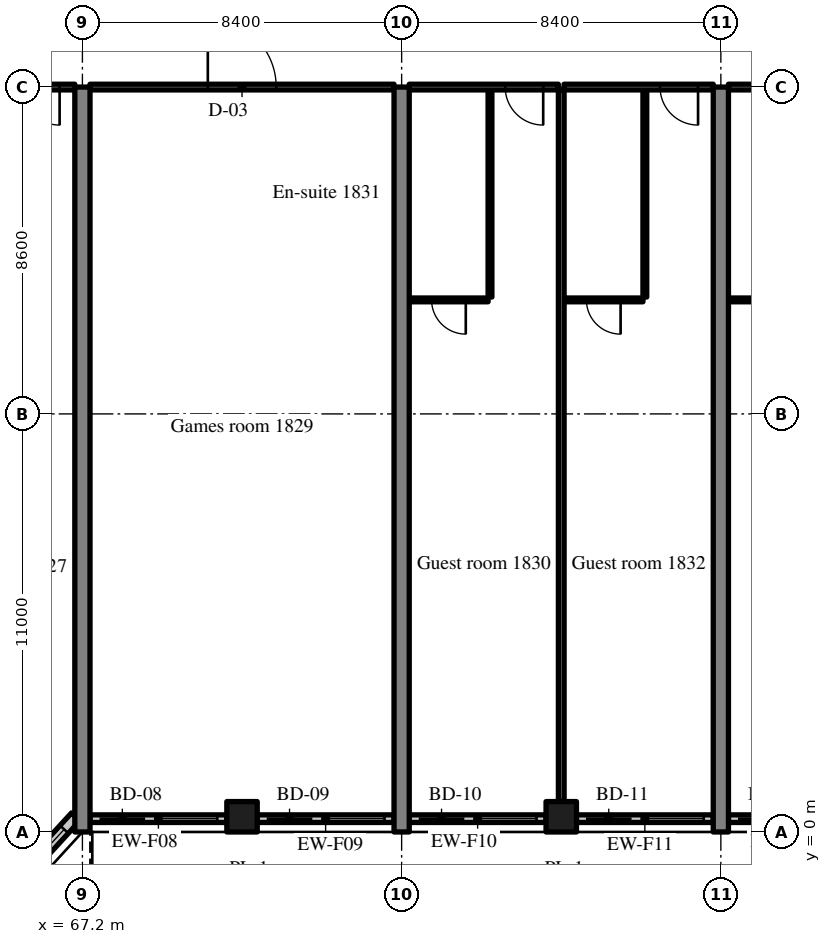
"""IFC4 building model, lengths in metres.
Left out: names, types, materials, properties, quantities, classifications, styles, units other than length and angle.
Written with IfcOpenShell. Run it as: python <this file> out.ifc"""

import sys

from ifc_helpers import new_model, si_unit, direction, frame, frame_2d, origin, origin_2d, place, context, subcontext, project, spatial, rectangle, extrude, source, transform, mapped, element, fill, save


model = new_model("IFC4")
c1 = context("Model", 3, precision=1e-05, world=origin(), true_north=direction((0.0, 1.0)))
c2 = subcontext(c1, "Body", "Model", "MODEL_VIEW")
j1 = project(units=[si_unit("LENGTHUNIT", "METRE"), si_unit("PLANEANGLEUNIT", "RADIAN")], contexts=[c1])
p1 = place(None, origin())
s1 = spatial("IfcSite", under=j1, at=p1, CompositionType="ELEMENT")
p2 = place(p1, origin())
s2 = spatial("IfcBuilding", under=s1, at=p2, CompositionType="ELEMENT")
p3 = place(p2, frame((0.0, 0.0, 77.2)))
s3 = spatial("IfcBuildingStorey", under=s2, at=p3, CompositionType="ELEMENT", Elevation=77.2)
m1 = source(origin(), c2, "Body", "SweptSolid", [
    extrude(rectangle(XDim=19.6, YDim=0.4, at=frame_2d((9.8, 0.0))), origin(), (0.0, 0.0, 1.0), 3.52),
])
for number, where, z_axis, x_axis in (
    (1, (67.2, 0.0, 0.0), (0.0, 0.0, 1.0), (0.0, 1.0, 0.0)),
    (2, (75.6, 0.0, 0.0), (0.0, 0.0, 1.0), (0.0, 1.0, 0.0)),
    (3, (84.0, 0.0, 0.0), (0.0, 0.0, 1.0), (0.0, 1.0, 0.0)),
):
    element("IfcWall", number, at=place(p3, frame(where, z_axis=z_axis, x_axis=x_axis)), inside=s3, PredefinedType="SHEAR", context=c2, shape_type="MappedRepresentation", body=[
        mapped(m1, transform((0.0, 0.0, 0.0), scale=1.0)),
    ])
m2 = source(origin(), c2, "Body", "SweptSolid", [
    extrude(rectangle(XDim=0.8, YDim=0.8, at=origin_2d()), origin(), (0.0, 0.0, 1.0), 3.52),
])
for number, where, z_axis, x_axis in (
    (4, (71.4, 0.4, 0.0), (0.0, 0.0, 1.0), (1.0, 0.0, 0.0)),
    (5, (79.8, 0.4, 0.0), (0.0, 0.0, 1.0), (1.0, 0.0, 0.0)),
):
    element("IfcColumn", number, at=place(p3, frame(where, z_axis=z_axis, x_axis=x_axis)), inside=s3, PredefinedType="COLUMN", context=c2, shape_type="MappedRepresentation", body=[
        mapped(m2, transform((0.0, 0.0, 0.0), scale=1.0)),
    ])
m3 = source(origin(), c2, "Body", "SweptSolid", [
    extrude(rectangle(XDim=2.398, YDim=0.3, at=frame_2d((1.199, 0.0))), origin(), (0.0, 0.0, 1.0), 3.52),
])
p4 = place(p3, frame((65.404, -1.369, 0.0), z_axis=(0.0, 0.0, 1.0), x_axis=(0.675374189419, 0.737475222815, 0.0)))
e6 = element("IfcWall", 6, at=p4, inside=s3, PredefinedType="SOLIDWALL", context=c2, shape_type="MappedRepresentation", body=[
    mapped(m3, transform((0.0, 0.0, 0.0), scale=1.0)),
])
m4 = source(origin(), c2, "Body", "SweptSolid", [
    extrude(rectangle(XDim=1.5, YDim=2.0, at=frame_2d((0.75, 1.0))), frame((0.0, 0.16, 0.0), z_axis=(0.0, -1.0, 0.0), x_axis=(1.0, 0.0, 0.0)), (0.0, 0.0, 1.0), 0.32),
])
p5 = place(p4, frame((0.449, 0.0, 0.9)))
e7 = element("IfcOpeningElement", 7, at=p5, cuts=e6, PredefinedType="OPENING", context=c2, shape_type="MappedRepresentation", body=[
    mapped(m4, transform((0.0, 0.0, 0.0), scale=1.0)),
])
m5 = source(origin(), c2, "Body", "SweptSolid", [
    extrude(rectangle(XDim=3.6, YDim=0.2, at=frame_2d((1.8, 0.0))), origin(), (0.0, 0.0, 1.0), 2.82),
])
p6 = place(p3, frame((67.4, 0.35, 0.0), z_axis=(0.0, 0.0, 1.0), x_axis=(1.0, 0.0, 0.0)))
e8 = element("IfcWall", 8, at=p6, inside=s3, PredefinedType="SOLIDWALL", context=c2, shape_type="MappedRepresentation", body=[
    mapped(m5, transform((0.0, 0.0, 0.0), scale=1.0)),
])
m6 = source(origin(), c2, "Body", "SweptSolid", [
    extrude(rectangle(XDim=1.2, YDim=2.4, at=frame_2d((0.6, 1.2))), frame((0.0, 0.11, 0.0), z_axis=(0.0, -1.0, 0.0), x_axis=(1.0, 0.0, 0.0)), (0.0, 0.0, 1.0), 0.22),
])
p7 = place(p6, frame((0.25, 0.0, 0.0)))
e9 = element("IfcOpeningElement", 9, at=p7, cuts=e8, PredefinedType="OPENING", context=c2, shape_type="MappedRepresentation", body=[
    mapped(m6, transform((0.0, 0.0, 0.0), scale=1.0)),
])
m7 = source(origin(), c2, "Body", "SweptSolid", [
    extrude(rectangle(XDim=1.5, YDim=1.5, at=frame_2d((0.75, 0.75))), frame((0.0, 0.11, 0.0), z_axis=(0.0, -1.0, 0.0), x_axis=(1.0, 0.0, 0.0)), (0.0, 0.0, 1.0), 0.22),
])
p8 = place(p6, frame((1.85, 0.0, 0.9)))
e10 = element("IfcOpeningElement", 10, at=p8, cuts=e8, PredefinedType="OPENING", context=c2, shape_type="MappedRepresentation", body=[
    mapped(m7, transform((0.0, 0.0, 0.0), scale=1.0)),
])
m8 = source(origin(), c2, "Body", "SweptSolid", [
    extrude(rectangle(XDim=3.6, YDim=0.2, at=frame_2d((1.8, 0.0))), origin(), (0.0, 0.0, 1.0), 2.82),
])
p9 = place(p3, frame((71.8, 0.35, 0.0), z_axis=(0.0, 0.0, 1.0), x_axis=(1.0, 0.0, 0.0)))
e11 = element("IfcWall", 11, at=p9, inside=s3, PredefinedType="SOLIDWALL", context=c2, shape_type="MappedRepresentation", body=[
    mapped(m8, transform((0.0, 0.0, 0.0), scale=1.0)),
])
p10 = place(p9, frame((0.25, 0.0, 0.0)))
e12 = element("IfcOpeningElement", 12, at=p10, cuts=e11, PredefinedType="OPENING", context=c2, shape_type="MappedRepresentation", body=[
    mapped(m6, transform((0.0, 0.0, 0.0), scale=1.0)),
])
p11 = place(p9, frame((1.85, 0.0, 0.9)))
e13 = element("IfcOpeningElement", 13, at=p11, cuts=e11, PredefinedType="OPENING", context=c2, shape_type="MappedRepresentation", body=[
    mapped(m7, transform((0.0, 0.0, 0.0), scale=1.0)),
])
p12 = place(p3, frame((75.8, 0.35, 0.0), z_axis=(0.0, 0.0, 1.0), x_axis=(1.0, 0.0, 0.0)))
e14 = element("IfcWall", 14, at=p12, inside=s3, PredefinedType="SOLIDWALL", context=c2, shape_type="MappedRepresentation", body=[
    mapped(m8, transform((0.0, 0.0, 0.0), scale=1.0)),
])
p13 = place(p12, frame((0.25, 0.0, 0.0)))
e15 = element("IfcOpeningElement", 15, at=p13, cuts=e14, PredefinedType="OPENING", context=c2, shape_type="MappedRepresentation", body=[
    mapped(m6, transform((0.0, 0.0, 0.0), scale=1.0)),
])
p14 = place(p12, frame((1.85, 0.0, 0.9)))
e16 = element("IfcOpeningElement", 16, at=p14, cuts=e14, PredefinedType="OPENING", context=c2, shape_type="MappedRepresentation", body=[
    mapped(m7, transform((0.0, 0.0, 0.0), scale=1.0)),
])
p15 = place(p3, frame((80.2, 0.35, 0.0), z_axis=(0.0, 0.0, 1.0), x_axis=(1.0, 0.0, 0.0)))
e17 = element("IfcWall", 17, at=p15, inside=s3, PredefinedType="SOLIDWALL", context=c2, shape_type="MappedRepresentation", body=[
    mapped(m5, transform((0.0, 0.0, 0.0), scale=1.0)),
])
p16 = place(p15, frame((0.25, 0.0, 0.0)))
e18 = element("IfcOpeningElement", 18, at=p16, cuts=e17, PredefinedType="OPENING", context=c2, shape_type="MappedRepresentation", body=[
    mapped(m6, transform((0.0, 0.0, 0.0), scale=1.0)),
])
p17 = place(p15, frame((1.85, 0.0, 0.9)))
e19 = element("IfcOpeningElement", 19, at=p17, cuts=e17, PredefinedType="OPENING", context=c2, shape_type="MappedRepresentation", body=[
    mapped(m7, transform((0.0, 0.0, 0.0), scale=1.0)),
])
p18 = place(p3, frame((84.2, 0.35, 0.0), z_axis=(0.0, 0.0, 1.0), x_axis=(1.0, 0.0, 0.0)))
e20 = element("IfcWall", 20, at=p18, inside=s3, PredefinedType="SOLIDWALL", context=c2, shape_type="MappedRepresentation", body=[
    mapped(m5, transform((0.0, 0.0, 0.0), scale=1.0)),
])
p19 = place(p18, frame((0.25, 0.0, 0.0)))
e21 = element("IfcOpeningElement", 21, at=p19, cuts=e20, PredefinedType="OPENING", context=c2, shape_type="MappedRepresentation", body=[
    mapped(m6, transform((0.0, 0.0, 0.0), scale=1.0)),
])
p20 = place(p18, frame((1.85, 0.0, 0.9)))
e22 = element("IfcOpeningElement", 22, at=p20, cuts=e20, PredefinedType="OPENING", context=c2, shape_type="MappedRepresentation", body=[
    mapped(m7, transform((0.0, 0.0, 0.0), scale=1.0)),
])
m9 = source(origin(), c2, "Body", "SweptSolid", [
    extrude(rectangle(XDim=3.925, YDim=0.15, at=frame_2d((1.962, 0.0))), origin(), (0.0, 0.0, 1.0), 2.82),
])
p21 = place(p3, frame((63.075, 19.6, 0.0), z_axis=(0.0, 0.0, 1.0), x_axis=(1.0, 0.0, 0.0)))
e23 = element("IfcWall", 23, at=p21, inside=s3, PredefinedType="PARTITIONING", context=c2, shape_type="MappedRepresentation", body=[
    mapped(m9, transform((0.0, 0.0, 0.0), scale=1.0)),
])
m10 = source(origin(), c2, "Body", "SweptSolid", [
    extrude(rectangle(XDim=1.0, YDim=2.1, at=frame_2d((0.5, 1.05))), frame((0.0, 0.085, 0.0), z_axis=(0.0, -1.0, 0.0), x_axis=(1.0, 0.0, 0.0)), (0.0, 0.0, 1.0), 0.17),
])
p22 = place(p21, frame((2.525, 0.0, 0.0)))
e24 = element("IfcOpeningElement", 24, at=p22, cuts=e23, PredefinedType="OPENING", context=c2, shape_type="MappedRepresentation", body=[
    mapped(m10, transform((0.0, 0.0, 0.0), scale=1.0)),
])
m11 = source(origin(), c2, "Body", "SweptSolid", [
    extrude(rectangle(XDim=8.0, YDim=0.15, at=frame_2d((4.0, 0.0))), origin(), (0.0, 0.0, 1.0), 2.82),
])
p23 = place(p3, frame((67.4, 19.6, 0.0), z_axis=(0.0, 0.0, 1.0), x_axis=(1.0, 0.0, 0.0)))
e25 = element("IfcWall", 25, at=p23, inside=s3, PredefinedType="PARTITIONING", context=c2, shape_type="MappedRepresentation", body=[
    mapped(m11, transform((0.0, 0.0, 0.0), scale=1.0)),
])
m12 = source(origin(), c2, "Body", "SweptSolid", [
    extrude(rectangle(XDim=1.8, YDim=2.1, at=frame_2d((0.9, 1.05))), frame((0.0, 0.085, 0.0), z_axis=(0.0, -1.0, 0.0), x_axis=(1.0, 0.0, 0.0)), (0.0, 0.0, 1.0), 0.17),
])
p24 = place(p23, frame((3.1, 0.0, 0.0)))
e26 = element("IfcOpeningElement", 26, at=p24, cuts=e25, PredefinedType="OPENING", context=c2, shape_type="MappedRepresentation", body=[
    mapped(m12, transform((0.0, 0.0, 0.0), scale=1.0)),
])
m13 = source(origin(), c2, "Body", "SweptSolid", [
    extrude(rectangle(XDim=5.45, YDim=0.1, at=frame_2d((2.725, 0.0))), origin(), (0.0, 0.0, 1.0), 3.52),
])
p25 = place(p3, frame((77.925, 14.075, 0.0), z_axis=(0.0, 0.0, 1.0), x_axis=(0.0, 1.0, 0.0)))
e27 = element("IfcWall", 27, at=p25, inside=s3, PredefinedType="PARTITIONING", context=c2, shape_type="MappedRepresentation", body=[
    mapped(m13, transform((0.0, 0.0, 0.0), scale=1.0)),
])
m14 = source(origin(), c2, "Body", "SweptSolid", [
    extrude(rectangle(XDim=2.075, YDim=0.1, at=frame_2d((1.038, 0.0))), origin(), (0.0, 0.0, 1.0), 3.52),
])
p26 = place(p3, frame((75.8, 14.0, 0.0), z_axis=(0.0, 0.0, 1.0), x_axis=(1.0, 0.0, 0.0)))
e28 = element("IfcWall", 28, at=p26, inside=s3, PredefinedType="PARTITIONING", context=c2, shape_type="MappedRepresentation", body=[
    mapped(m14, transform((0.0, 0.0, 0.0), scale=1.0)),
])
m15 = source(origin(), c2, "Body", "SweptSolid", [
    extrude(rectangle(XDim=0.9, YDim=2.1, at=frame_2d((0.45, 1.05))), frame((0.0, 0.06, 0.0), z_axis=(0.0, -1.0, 0.0), x_axis=(1.0, 0.0, 0.0)), (0.0, 0.0, 1.0), 0.12),
])
p27 = place(p26, frame((0.588, 0.0, 0.0)))
e29 = element("IfcOpeningElement", 29, at=p27, cuts=e28, PredefinedType="OPENING", context=c2, shape_type="MappedRepresentation", body=[
    mapped(m15, transform((0.0, 0.0, 0.0), scale=1.0)),
])
p28 = place(p3, frame((75.8, 19.6, 0.0), z_axis=(0.0, 0.0, 1.0), x_axis=(1.0, 0.0, 0.0)))
e30 = element("IfcWall", 30, at=p28, inside=s3, PredefinedType="PARTITIONING", context=c2, shape_type="MappedRepresentation", body=[
    mapped(m9, transform((0.0, 0.0, 0.0), scale=1.0)),
])
p29 = place(p28, frame((2.525, 0.0, 0.0)))
e31 = element("IfcOpeningElement", 31, at=p29, cuts=e30, PredefinedType="OPENING", context=c2, shape_type="MappedRepresentation", body=[
    mapped(m10, transform((0.0, 0.0, 0.0), scale=1.0)),
])
p30 = place(p3, frame((82.0, 14.075, 0.0), z_axis=(0.0, 0.0, 1.0), x_axis=(0.0, 1.0, 0.0)))
e32 = element("IfcWall", 32, at=p30, inside=s3, PredefinedType="PARTITIONING", context=c2, shape_type="MappedRepresentation", body=[
    mapped(m13, transform((0.0, 0.0, 0.0), scale=1.0)),
])
p31 = place(p3, frame((79.875, 14.0, 0.0), z_axis=(0.0, 0.0, 1.0), x_axis=(1.0, 0.0, 0.0)))
e33 = element("IfcWall", 33, at=p31, inside=s3, PredefinedType="PARTITIONING", context=c2, shape_type="MappedRepresentation", body=[
    mapped(m14, transform((0.0, 0.0, 0.0), scale=1.0)),
])
p32 = place(p31, frame((0.587, 0.0, 0.0)))
e34 = element("IfcOpeningElement", 34, at=p32, cuts=e33, PredefinedType="OPENING", context=c2, shape_type="MappedRepresentation", body=[
    mapped(m15, transform((0.0, 0.0, 0.0), scale=1.0)),
])
p33 = place(p3, frame((79.875, 19.6, 0.0), z_axis=(0.0, 0.0, 1.0), x_axis=(1.0, 0.0, 0.0)))
e35 = element("IfcWall", 35, at=p33, inside=s3, PredefinedType="PARTITIONING", context=c2, shape_type="MappedRepresentation", body=[
    mapped(m9, transform((0.0, 0.0, 0.0), scale=1.0)),
])
p34 = place(p33, frame((2.525, 0.0, 0.0)))
e36 = element("IfcOpeningElement", 36, at=p34, cuts=e35, PredefinedType="OPENING", context=c2, shape_type="MappedRepresentation", body=[
    mapped(m10, transform((0.0, 0.0, 0.0), scale=1.0)),
])
m16 = source(origin(), c2, "Body", "SweptSolid", [
    extrude(rectangle(XDim=18.725, YDim=0.15, at=frame_2d((9.362, 0.0))), origin(), (0.0, 0.0, 1.0), 3.52),
])
p35 = place(p3, frame((79.8, 0.8, 0.0), z_axis=(0.0, 0.0, 1.0), x_axis=(0.0, 1.0, 0.0)))
e37 = element("IfcWall", 37, at=p35, inside=s3, PredefinedType="PARTITIONING", context=c2, shape_type="MappedRepresentation", body=[
    mapped(m16, transform((0.0, 0.0, 0.0), scale=1.0)),
])
m17 = source(origin(), c2, "Body", "SweptSolid", [
    extrude(rectangle(XDim=2.55, YDim=0.1, at=frame_2d((1.275, 0.0))), origin(), (0.0, 0.0, 1.0), 3.52),
])
p36 = place(p3, frame((84.2, 14.0, 0.0), z_axis=(0.0, 0.0, 1.0), x_axis=(1.0, 0.0, 0.0)))
e38 = element("IfcWall", 38, at=p36, inside=s3, PredefinedType="PARTITIONING", context=c2, shape_type="MappedRepresentation", body=[
    mapped(m17, transform((0.0, 0.0, 0.0), scale=1.0)),
])
p37 = place(p36, frame((0.825, 0.0, 0.0)))
e39 = element("IfcOpeningElement", 39, at=p37, cuts=e38, PredefinedType="OPENING", context=c2, shape_type="MappedRepresentation", body=[
    mapped(m15, transform((0.0, 0.0, 0.0), scale=1.0)),
])
p38 = place(p3, frame((84.2, 19.6, 0.0), z_axis=(0.0, 0.0, 1.0), x_axis=(1.0, 0.0, 0.0)))
e40 = element("IfcWall", 40, at=p38, inside=s3, PredefinedType="PARTITIONING", context=c2, shape_type="MappedRepresentation", body=[
    mapped(m11, transform((0.0, 0.0, 0.0), scale=1.0)),
])
p39 = place(p38, frame((6.6, 0.0, 0.0)))
e41 = element("IfcOpeningElement", 41, at=p39, cuts=e40, PredefinedType="OPENING", context=c2, shape_type="MappedRepresentation", body=[
    mapped(m10, transform((0.0, 0.0, 0.0), scale=1.0)),
])
m18 = source(origin(), c2, "Body", "SweptSolid", [
    extrude(rectangle(XDim=1.5, YDim=2.0, at=frame_2d((0.75, 1.0))), frame((0.0, 0.03, 0.0), z_axis=(0.0, -1.0, 0.0), x_axis=(1.0, 0.0, 0.0)), (0.0, 0.0, 1.0), 0.06),
])
p40 = place(p5, origin())
e42 = element("IfcWindow", 42, at=p40, inside=s3, PartitioningType="SINGLE_PANEL", PredefinedType="WINDOW", context=c2, shape_type="MappedRepresentation", body=[
    mapped(m18, transform((0.0, 0.0, 0.0), scale=1.0)),
])
fill(e7, e42)
m19 = source(origin(), c2, "Body", "SweptSolid", [
    extrude(rectangle(XDim=1.2, YDim=2.4, at=frame_2d((0.6, 1.2))), frame((0.0, 0.025, 0.0), z_axis=(0.0, -1.0, 0.0), x_axis=(1.0, 0.0, 0.0)), (0.0, 0.0, 1.0), 0.05),
])
p41 = place(p7, origin())
e43 = element("IfcDoor", 43, at=p41, inside=s3, OperationType="SLIDING_TO_RIGHT", PredefinedType="DOOR", context=c2, shape_type="MappedRepresentation", body=[
    mapped(m19, transform((0.0, 0.0, 0.0), scale=1.0)),
])
fill(e9, e43)
m20 = source(origin(), c2, "Body", "SweptSolid", [
    extrude(rectangle(XDim=1.5, YDim=1.5, at=frame_2d((0.75, 0.75))), frame((0.0, 0.03, 0.0), z_axis=(0.0, -1.0, 0.0), x_axis=(1.0, 0.0, 0.0)), (0.0, 0.0, 1.0), 0.06),
])
p42 = place(p8, origin())
e44 = element("IfcWindow", 44, at=p42, inside=s3, PartitioningType="SINGLE_PANEL", PredefinedType="WINDOW", context=c2, shape_type="MappedRepresentation", body=[
    mapped(m20, transform((0.0, 0.0, 0.0), scale=1.0)),
])
fill(e10, e44)
p43 = place(p10, origin())
e45 = element("IfcDoor", 45, at=p43, inside=s3, OperationType="SLIDING_TO_LEFT", PredefinedType="DOOR", context=c2, shape_type="MappedRepresentation", body=[
    mapped(m19, transform((0.0, 0.0, 0.0), scale=1.0)),
])
fill(e12, e45)
p44 = place(p11, origin())
e46 = element("IfcWindow", 46, at=p44, inside=s3, PartitioningType="SINGLE_PANEL", PredefinedType="WINDOW", context=c2, shape_type="MappedRepresentation", body=[
    mapped(m20, transform((0.0, 0.0, 0.0), scale=1.0)),
])
fill(e13, e46)
p45 = place(p13, origin())
e47 = element("IfcDoor", 47, at=p45, inside=s3, OperationType="SLIDING_TO_RIGHT", PredefinedType="DOOR", context=c2, shape_type="MappedRepresentation", body=[
    mapped(m19, transform((0.0, 0.0, 0.0), scale=1.0)),
])
fill(e15, e47)
p46 = place(p14, origin())
e48 = element("IfcWindow", 48, at=p46, inside=s3, PartitioningType="SINGLE_PANEL", PredefinedType="WINDOW", context=c2, shape_type="MappedRepresentation", body=[
    mapped(m20, transform((0.0, 0.0, 0.0), scale=1.0)),
])
fill(e16, e48)
p47 = place(p16, origin())
e49 = element("IfcDoor", 49, at=p47, inside=s3, OperationType="SLIDING_TO_LEFT", PredefinedType="DOOR", context=c2, shape_type="MappedRepresentation", body=[
    mapped(m19, transform((0.0, 0.0, 0.0), scale=1.0)),
])
fill(e18, e49)
p48 = place(p17, origin())
e50 = element("IfcWindow", 50, at=p48, inside=s3, PartitioningType="SINGLE_PANEL", PredefinedType="WINDOW", context=c2, shape_type="MappedRepresentation", body=[
    mapped(m20, transform((0.0, 0.0, 0.0), scale=1.0)),
])
fill(e19, e50)
p49 = place(p19, origin())
e51 = element("IfcDoor", 51, at=p49, inside=s3, OperationType="SLIDING_TO_RIGHT", PredefinedType="DOOR", context=c2, shape_type="MappedRepresentation", body=[
    mapped(m19, transform((0.0, 0.0, 0.0), scale=1.0)),
])
fill(e21, e51)
m21 = source(origin(), c2, "Body", "SweptSolid", [
    extrude(rectangle(XDim=1.0, YDim=2.1, at=frame_2d((0.5, 1.05))), frame((0.0, 0.025, 0.0), z_axis=(0.0, -1.0, 0.0), x_axis=(1.0, 0.0, 0.0)), (0.0, 0.0, 1.0), 0.05),
])
p50 = place(p22, origin())
e52 = element("IfcDoor", 52, at=p50, inside=s3, OperationType="SINGLE_SWING_RIGHT", PredefinedType="DOOR", context=c2, shape_type="MappedRepresentation", body=[
    mapped(m21, transform((0.0, 0.0, 0.0), scale=1.0)),
])
fill(e24, e52)
m22 = source(origin(), c2, "Body", "SweptSolid", [
    extrude(rectangle(XDim=1.8, YDim=2.1, at=frame_2d((0.9, 1.05))), frame((0.0, 0.025, 0.0), z_axis=(0.0, -1.0, 0.0), x_axis=(1.0, 0.0, 0.0)), (0.0, 0.0, 1.0), 0.05),
])
p51 = place(p24, origin())
e53 = element("IfcDoor", 53, at=p51, inside=s3, OperationType="DOUBLE_DOOR_SINGLE_SWING", PredefinedType="DOOR", context=c2, shape_type="MappedRepresentation", body=[
    mapped(m22, transform((0.0, 0.0, 0.0), scale=1.0)),
])
fill(e26, e53)
m23 = source(origin(), c2, "Body", "SweptSolid", [
    extrude(rectangle(XDim=0.9, YDim=2.1, at=frame_2d((0.45, 1.05))), frame((0.0, 0.025, 0.0), z_axis=(0.0, -1.0, 0.0), x_axis=(1.0, 0.0, 0.0)), (0.0, 0.0, 1.0), 0.05),
])
p52 = place(p27, origin())
e54 = element("IfcDoor", 54, at=p52, inside=s3, OperationType="SINGLE_SWING_RIGHT", PredefinedType="DOOR", context=c2, shape_type="MappedRepresentation", body=[
    mapped(m23, transform((0.0, 0.0, 0.0), scale=1.0)),
])
fill(e29, e54)
p53 = place(p29, origin())
e55 = element("IfcDoor", 55, at=p53, inside=s3, OperationType="SINGLE_SWING_RIGHT", PredefinedType="DOOR", context=c2, shape_type="MappedRepresentation", body=[
    mapped(m21, transform((0.0, 0.0, 0.0), scale=1.0)),
])
fill(e31, e55)
p54 = place(p32, origin())
e56 = element("IfcDoor", 56, at=p54, inside=s3, OperationType="SINGLE_SWING_RIGHT", PredefinedType="DOOR", context=c2, shape_type="MappedRepresentation", body=[
    mapped(m23, transform((0.0, 0.0, 0.0), scale=1.0)),
])
fill(e34, e56)
p55 = place(p34, origin())
e57 = element("IfcDoor", 57, at=p55, inside=s3, OperationType="SINGLE_SWING_RIGHT", PredefinedType="DOOR", context=c2, shape_type="MappedRepresentation", body=[
    mapped(m21, transform((0.0, 0.0, 0.0), scale=1.0)),
])
fill(e36, e57)
save(model, sys.argv[1])
